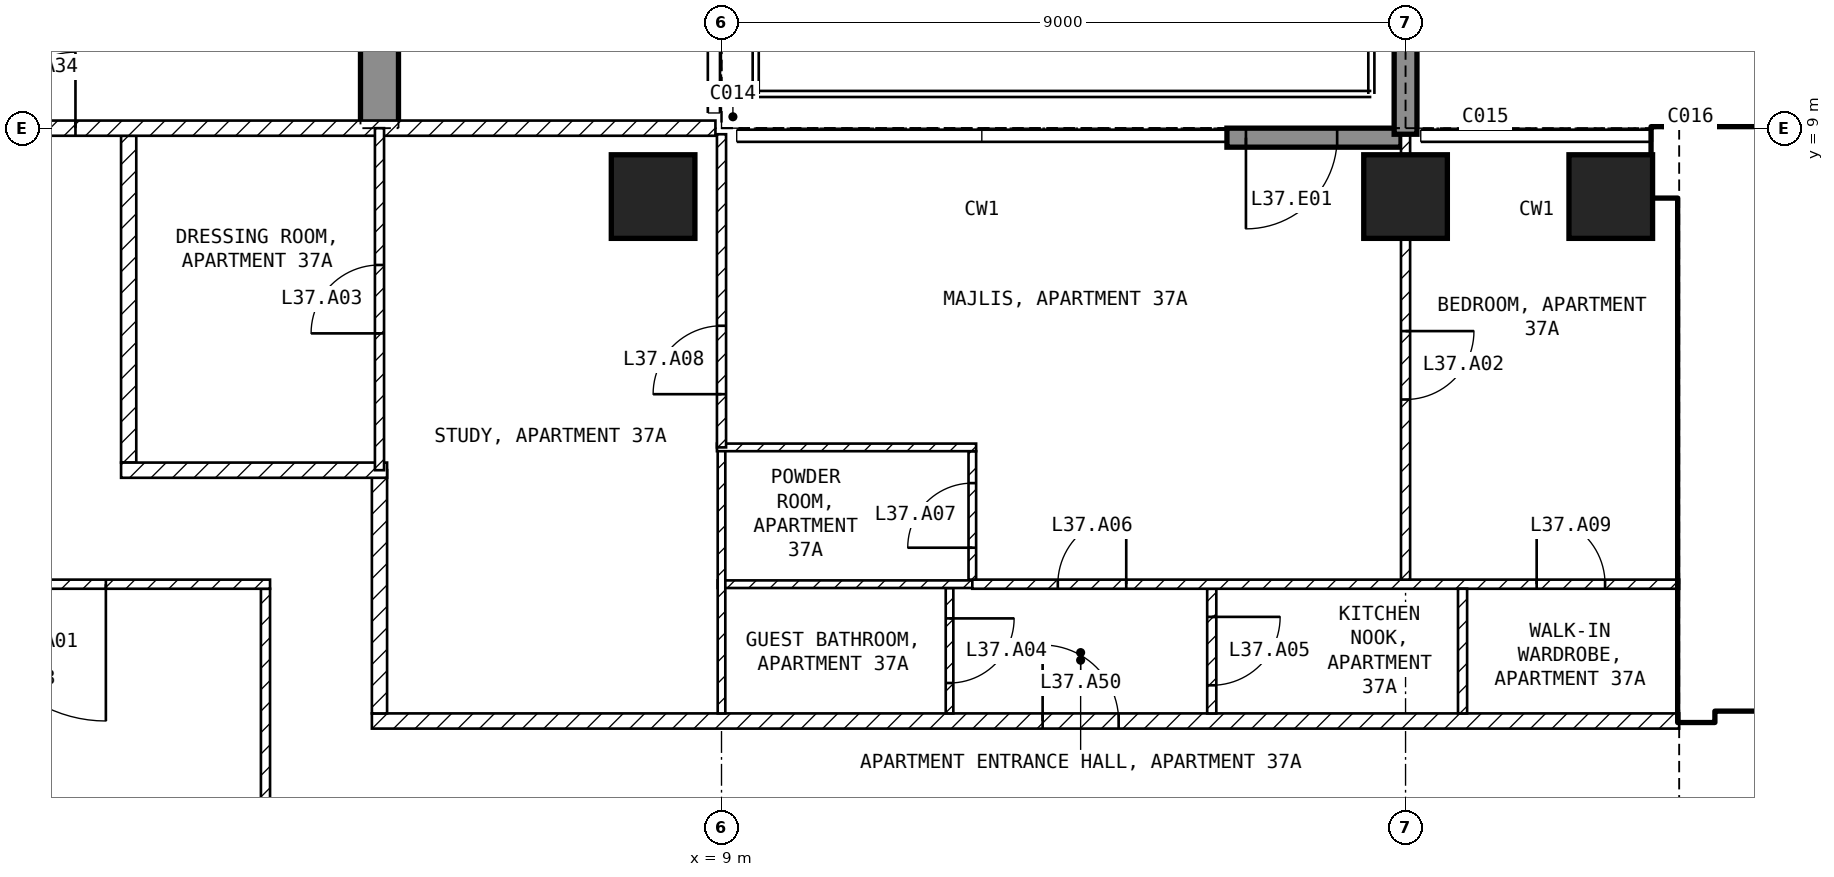
"""IFC4 building model, lengths in metres.
Left out: names, types, materials, properties, quantities, classifications, styles, units other than length and angle.
Written with IfcOpenShell. Run it as: python <this file> out.ifc"""

import sys

from ifc_helpers import new_model, si_unit, direction, frame, frame_2d, origin, origin_2d, place, context, subcontext, project, spatial, polyline, rectangle, outline, extrude, element, fill, save


model = new_model("IFC4")
c1 = context("Model", 3, precision=1e-05, world=origin(), true_north=direction((0.0, 1.0)))
c2 = subcontext(c1, "Body", "Model", "MODEL_VIEW")
j1 = project(units=[si_unit("LENGTHUNIT", "METRE"), si_unit("PLANEANGLEUNIT", "RADIAN")], contexts=[c1])
p1 = place(None, origin())
s1 = spatial("IfcSite", under=j1, at=p1, CompositionType="ELEMENT")
p2 = place(p1, origin())
s2 = spatial("IfcBuilding", under=s1, at=p2, CompositionType="ELEMENT")
p3 = place(p2, frame((0.0, 0.0, 151.4)))
s3 = spatial("IfcBuildingStorey", under=s2, at=p3, CompositionType="ELEMENT", Elevation=151.4)
for number, where, z_axis, x_axis in (
    (1, (8.1, 8.1, -0.25), (0.0, 0.0, 1.0), (1.0, 0.0, 0.0)),
    (2, (18.0, 8.1, -0.25), (0.0, 0.0, 1.0), (1.0, 0.0, 0.0)),
    (3, (20.7, 8.1, -0.25), (0.0, 0.0, 1.0), (1.0, 0.0, 0.0)),
):
    element("IfcColumn", number, at=place(p3, frame(where, z_axis=z_axis, x_axis=x_axis)), inside=s3, PredefinedType="COLUMN", context=c2, shape_type="SweptSolid", body=[
        extrude(rectangle(XDim=1.1, YDim=1.1, at=origin_2d()), origin(), (0.0, 0.0, 1.0), 3.45),
    ])
p4 = place(p3, frame((4.25, 9.0, -0.25), z_axis=(1.0, 0.0, 0.0), x_axis=(0.0, 1.0, 0.0)))
e4 = element("IfcWall", 4, at=p4, inside=s3, PredefinedType="SHEAR", context=c2, shape_type="SweptSolid", body=[
    extrude(outline(polyline([(0.0, 0.0), (2.1, 0.0), (2.1, 2.65), (4.5, 2.65), (4.5, 0.0), (9.9, 0.0), (9.9, 2.65), (12.3, 2.65), (12.3, 0.0), (16.55, 0.0), (16.55, 3.45), (0.0, 3.45), (0.0, 0.0)])), origin(), (0.0, 0.0, 1.0), 0.5),
])
p5 = place(p3, frame((17.94, 8.875, 0.0), z_axis=(0.0, 0.0, 1.0), x_axis=(-1.0, 0.0, 0.0)))
e5 = element("IfcWall", 5, at=p5, inside=s3, PredefinedType="SOLIDWALL", context=c2, shape_type="SweptSolid", body=[
    extrude(rectangle(XDim=2.29, YDim=0.25, at=frame_2d((1.145, 0.0))), origin(), (0.0, 0.0, 1.0), 3.2),
])
p6 = place(p5, frame((0.84, 0.0, 0.0)))
e6 = element("IfcOpeningElement", 6, at=p6, cuts=e5, PredefinedType="OPENING", context=c2, shape_type="SweptSolid", body=[
    extrude(rectangle(XDim=1.2, YDim=2.4, at=frame_2d((0.6, 1.2))), frame((0.0, 0.135, 0.0), z_axis=(0.0, -1.0, 0.0), x_axis=(1.0, 0.0, 0.0)), (0.0, 0.0, 1.0), 0.27),
])
p7 = place(p3, frame((18.0, 8.92, 0.0), z_axis=(0.0, 0.0, 1.0), x_axis=(0.0, 1.0, 0.0)))
e7 = element("IfcWall", 7, at=p7, inside=s3, PredefinedType="SOLIDWALL", context=c2, shape_type="SweptSolid", body=[
    extrude(rectangle(XDim=2.82, YDim=0.3, at=frame_2d((1.41, 0.0))), origin(), (0.0, 0.0, 1.0), 3.2),
])
p8 = place(p3, frame((21.25, 8.55, 0.0), z_axis=(0.0, 0.0, 1.0), x_axis=(1.0, 0.0, 0.0)))
e8 = element("IfcWall", 8, at=p8, inside=s3, PredefinedType="SHEAR", context=c2, shape_type="SweptSolid", body=[
    extrude(rectangle(XDim=8.2, YDim=0.9, at=frame_2d((4.1, 0.0))), origin(), (0.0, 0.0, 1.0), 3.2),
])
p9 = place(p3, frame((21.825, 1.2, 0.0), z_axis=(0.0, 0.0, 1.0), x_axis=(0.0, 1.0, 0.0)))
e9 = element("IfcWall", 9, at=p9, inside=s3, PredefinedType="SHEAR", context=c2, shape_type="SweptSolid", body=[
    extrude(rectangle(XDim=6.9, YDim=0.45, at=frame_2d((3.45, 0.0))), origin(), (0.0, 0.0, 1.0), 3.2),
])
p10 = place(p3, frame((22.05, 1.45, 0.0), z_axis=(0.0, 0.0, 1.0), x_axis=(1.0, 0.0, 0.0)))
e10 = element("IfcWall", 10, at=p10, inside=s3, PredefinedType="SOLIDWALL", context=c2, shape_type="SweptSolid", body=[
    extrude(rectangle(XDim=11.0, YDim=0.2, at=frame_2d((5.5, 0.0))), origin(), (0.0, 0.0, 1.0), 3.2),
])
p11 = place(p10, frame((0.75, 0.0, 0.0)))
e11 = element("IfcOpeningElement", 11, at=p11, cuts=e10, PredefinedType="OPENING", context=c2, shape_type="SweptSolid", body=[
    extrude(rectangle(XDim=1.0, YDim=2.1, at=frame_2d((0.5, 1.05))), frame((0.0, 0.11, 0.0), z_axis=(0.0, -1.0, 0.0), x_axis=(1.0, 0.0, 0.0)), (0.0, 0.0, 1.0), 0.22),
])
p12 = place(p10, frame((3.25, 0.0, 0.0)))
e12 = element("IfcOpeningElement", 12, at=p12, cuts=e10, PredefinedType="OPENING", context=c2, shape_type="SweptSolid", body=[
    extrude(rectangle(XDim=1.0, YDim=2.1, at=frame_2d((0.5, 1.05))), frame((0.0, 0.11, 0.0), z_axis=(0.0, -1.0, 0.0), x_axis=(1.0, 0.0, 0.0)), (0.0, 0.0, 1.0), 0.22),
])
p13 = place(p10, frame((9.075, 0.0, 0.0)))
e13 = element("IfcOpeningElement", 13, at=p13, cuts=e10, PredefinedType="OPENING", context=c2, shape_type="SweptSolid", body=[
    extrude(rectangle(XDim=0.9, YDim=2.1, at=frame_2d((0.45, 1.05))), frame((0.0, 0.11, 0.0), z_axis=(0.0, -1.0, 0.0), x_axis=(1.0, 0.0, 0.0)), (0.0, 0.0, 1.0), 0.22),
])
p14 = place(p3, frame((22.05, 5.15, 0.0), z_axis=(0.0, 0.0, 1.0), x_axis=(1.0, 0.0, 0.0)))
e14 = element("IfcWall", 14, at=p14, inside=s3, PredefinedType="SOLIDWALL", context=c2, shape_type="SweptSolid", body=[
    extrude(rectangle(XDim=6.3, YDim=0.2, at=frame_2d((3.15, 0.0))), origin(), (0.0, 0.0, 1.0), 3.2),
])
p15 = place(p14, frame((0.2, 0.0, 0.0)))
e15 = element("IfcOpeningElement", 15, at=p15, cuts=e14, PredefinedType="OPENING", context=c2, shape_type="SweptSolid", body=[
    extrude(rectangle(XDim=1.0, YDim=2.1, at=frame_2d((0.5, 1.05))), frame((0.0, 0.11, 0.0), z_axis=(0.0, -1.0, 0.0), x_axis=(1.0, 0.0, 0.0)), (0.0, 0.0, 1.0), 0.22),
])
p16 = place(p3, frame((3.0, -2.94, 0.0), z_axis=(0.0, 0.0, 1.0), x_axis=(0.0, 1.0, 0.0)))
e16 = element("IfcWall", 16, at=p16, inside=s3, PredefinedType="PARTITIONING", context=c2, shape_type="SweptSolid", body=[
    extrude(rectangle(XDim=5.88, YDim=0.12, at=frame_2d((2.94, 0.0))), origin(), (0.0, 0.0, 1.0), 3.2),
])
p17 = place(p3, frame((3.06, 3.0, 0.0), z_axis=(0.0, 0.0, 1.0), x_axis=(-1.0, 0.0, 0.0)))
e17 = element("IfcWall", 17, at=p17, inside=s3, PredefinedType="PARTITIONING", context=c2, shape_type="SweptSolid", body=[
    extrude(rectangle(XDim=6.12, YDim=0.12, at=frame_2d((3.06, 0.0))), origin(), (0.0, 0.0, 1.0), 3.2),
])
p18 = place(p17, frame((2.16, 0.0, 0.0)))
e18 = element("IfcOpeningElement", 18, at=p18, cuts=e17, PredefinedType="OPENING", context=c2, shape_type="SweptSolid", body=[
    extrude(rectangle(XDim=1.8, YDim=2.1, at=frame_2d((0.9, 1.05))), frame((0.0, 0.07, 0.0), z_axis=(0.0, -1.0, 0.0), x_axis=(1.0, 0.0, 0.0)), (0.0, 0.0, 1.0), 0.14),
])
p19 = place(p3, frame((4.4, 1.2, 0.0), z_axis=(0.0, 0.0, 1.0), x_axis=(1.0, 0.0, 0.0)))
e19 = element("IfcWall", 19, at=p19, inside=s3, PredefinedType="PARTITIONING", context=c2, shape_type="SweptSolid", body=[
    extrude(rectangle(XDim=17.2, YDim=0.2, at=frame_2d((8.6, 0.0))), origin(), (0.0, 0.0, 1.0), 3.2),
])
p20 = place(p19, frame((8.825, 0.0, 0.0)))
e20 = element("IfcOpeningElement", 20, at=p20, cuts=e19, PredefinedType="OPENING", context=c2, shape_type="SweptSolid", body=[
    extrude(rectangle(XDim=1.0, YDim=2.1, at=frame_2d((0.5, 1.05))), frame((0.0, 0.11, 0.0), z_axis=(0.0, -1.0, 0.0), x_axis=(1.0, 0.0, 0.0)), (0.0, 0.0, 1.0), 0.22),
])
p21 = place(p3, frame((4.5, 4.5, 0.0), z_axis=(0.0, 0.0, 1.0), x_axis=(0.0, -1.0, 0.0)))
e21 = element("IfcWall", 21, at=p21, inside=s3, PredefinedType="PARTITIONING", context=c2, shape_type="SweptSolid", body=[
    extrude(rectangle(XDim=3.2, YDim=0.2, at=frame_2d((1.6, 0.0))), origin(), (0.0, 0.0, 1.0), 3.2),
])
p22 = place(p3, frame((1.2, 8.9, 0.0), z_axis=(0.0, 0.0, 1.0), x_axis=(0.0, -1.0, 0.0)))
e22 = element("IfcWall", 22, at=p22, inside=s3, PredefinedType="PARTITIONING", context=c2, shape_type="SweptSolid", body=[
    extrude(rectangle(XDim=4.3, YDim=0.2, at=frame_2d((2.15, 0.0))), origin(), (0.0, 0.0, 1.0), 3.2),
])
p23 = place(p3, frame((1.1, 4.5, 0.0), z_axis=(0.0, 0.0, 1.0), x_axis=(1.0, 0.0, 0.0)))
e23 = element("IfcWall", 23, at=p23, inside=s3, PredefinedType="PARTITIONING", context=c2, shape_type="SweptSolid", body=[
    extrude(rectangle(XDim=3.5, YDim=0.2, at=frame_2d((1.75, 0.0))), origin(), (0.0, 0.0, 1.0), 3.2),
])
p24 = place(p3, frame((-8.92, 9.0, 0.0), z_axis=(0.0, 0.0, 1.0), x_axis=(1.0, 0.0, 0.0)))
e24 = element("IfcWall", 24, at=p24, inside=s3, PredefinedType="PARTITIONING", context=c2, shape_type="SweptSolid", body=[
    extrude(rectangle(XDim=17.84, YDim=0.2, at=frame_2d((8.92, 0.0))), origin(), (0.0, 0.0, 1.0), 3.2),
])
p25 = place(p24, frame((8.42, 0.0, 0.0)))
e25 = element("IfcOpeningElement", 25, at=p25, cuts=e24, PredefinedType="OPENING", context=c2, shape_type="SweptSolid", body=[
    extrude(rectangle(XDim=1.0, YDim=2.1, at=frame_2d((0.5, 1.05))), frame((0.0, 0.11, 0.0), z_axis=(0.0, -1.0, 0.0), x_axis=(1.0, 0.0, 0.0)), (0.0, 0.0, 1.0), 0.22),
])
p26 = place(p3, frame((12.0, 2.95, 0.0), z_axis=(0.0, 0.0, 1.0), x_axis=(0.0, -1.0, 0.0)))
e26 = element("IfcWall", 26, at=p26, inside=s3, PredefinedType="PARTITIONING", context=c2, shape_type="SweptSolid", body=[
    extrude(rectangle(XDim=1.65, YDim=0.1, at=frame_2d((0.825, 0.0))), origin(), (0.0, 0.0, 1.0), 3.2),
])
p27 = place(p26, frame((0.4, 0.0, 0.0)))
e27 = element("IfcOpeningElement", 27, at=p27, cuts=e26, PredefinedType="OPENING", context=c2, shape_type="SweptSolid", body=[
    extrude(rectangle(XDim=0.85, YDim=2.1, at=frame_2d((0.425, 1.05))), frame((0.0, 0.06, 0.0), z_axis=(0.0, -1.0, 0.0), x_axis=(1.0, 0.0, 0.0)), (0.0, 0.0, 1.0), 0.12),
])
p28 = place(p3, frame((8.95, 3.0, 0.0), z_axis=(0.0, 0.0, 1.0), x_axis=(1.0, 0.0, 0.0)))
e28 = element("IfcWall", 28, at=p28, inside=s3, PredefinedType="PARTITIONING", context=c2, shape_type="SweptSolid", body=[
    extrude(rectangle(XDim=3.35, YDim=0.1, at=frame_2d((1.675, 0.0))), origin(), (0.0, 0.0, 1.0), 3.2),
])
p29 = place(p3, frame((9.0, 1.3, 0.0), z_axis=(0.0, 0.0, 1.0), x_axis=(0.0, 1.0, 0.0)))
e29 = element("IfcWall", 29, at=p29, inside=s3, PredefinedType="PARTITIONING", context=c2, shape_type="SweptSolid", body=[
    extrude(rectangle(XDim=3.5, YDim=0.1, at=frame_2d((1.75, 0.0))), origin(), (0.0, 0.0, 1.0), 3.2),
])
p30 = place(p3, frame((15.45, 2.94, 0.0), z_axis=(0.0, 0.0, 1.0), x_axis=(0.0, -1.0, 0.0)))
e30 = element("IfcWall", 30, at=p30, inside=s3, PredefinedType="PARTITIONING", context=c2, shape_type="SweptSolid", body=[
    extrude(rectangle(XDim=1.64, YDim=0.12, at=frame_2d((0.82, 0.0))), origin(), (0.0, 0.0, 1.0), 3.2),
])
p31 = place(p30, frame((0.37, 0.0, 0.0)))
e31 = element("IfcOpeningElement", 31, at=p31, cuts=e30, PredefinedType="OPENING", context=c2, shape_type="SweptSolid", body=[
    extrude(rectangle(XDim=0.9, YDim=2.1, at=frame_2d((0.45, 1.05))), frame((0.0, 0.07, 0.0), z_axis=(0.0, -1.0, 0.0), x_axis=(1.0, 0.0, 0.0)), (0.0, 0.0, 1.0), 0.14),
])
p32 = place(p3, frame((12.3, 3.0, 0.0), z_axis=(0.0, 0.0, 1.0), x_axis=(1.0, 0.0, 0.0)))
e32 = element("IfcWall", 32, at=p32, inside=s3, PredefinedType="PARTITIONING", context=c2, shape_type="SweptSolid", body=[
    extrude(rectangle(XDim=9.3, YDim=0.12, at=frame_2d((4.65, 0.0))), origin(), (0.0, 0.0, 1.0), 3.2),
])
p33 = place(p32, frame((1.125, 0.0, 0.0)))
e33 = element("IfcOpeningElement", 33, at=p33, cuts=e32, PredefinedType="OPENING", context=c2, shape_type="SweptSolid", body=[
    extrude(rectangle(XDim=0.9, YDim=2.1, at=frame_2d((0.45, 1.05))), frame((0.0, 0.07, 0.0), z_axis=(0.0, -1.0, 0.0), x_axis=(1.0, 0.0, 0.0)), (0.0, 0.0, 1.0), 0.14),
])
p34 = place(p32, frame((7.425, 0.0, 0.0)))
e34 = element("IfcOpeningElement", 34, at=p34, cuts=e32, PredefinedType="OPENING", context=c2, shape_type="SweptSolid", body=[
    extrude(rectangle(XDim=0.9, YDim=2.1, at=frame_2d((0.45, 1.05))), frame((0.0, 0.07, 0.0), z_axis=(0.0, -1.0, 0.0), x_axis=(1.0, 0.0, 0.0)), (0.0, 0.0, 1.0), 0.14),
])
p35 = place(p3, frame((18.75, 2.94, 0.0), z_axis=(0.0, 0.0, 1.0), x_axis=(0.0, -1.0, 0.0)))
e35 = element("IfcWall", 35, at=p35, inside=s3, PredefinedType="PARTITIONING", context=c2, shape_type="SweptSolid", body=[
    extrude(rectangle(XDim=1.64, YDim=0.12, at=frame_2d((0.82, 0.0))), origin(), (0.0, 0.0, 1.0), 3.2),
])
p36 = place(p3, frame((12.3, 3.06, 0.0), z_axis=(0.0, 0.0, 1.0), x_axis=(0.0, 1.0, 0.0)))
e36 = element("IfcWall", 36, at=p36, inside=s3, PredefinedType="PARTITIONING", context=c2, shape_type="SweptSolid", body=[
    extrude(rectangle(XDim=1.69, YDim=0.1, at=frame_2d((0.845, 0.0))), origin(), (0.0, 0.0, 1.0), 3.2),
])
p37 = place(p36, frame((0.42, 0.0, 0.0)))
e37 = element("IfcOpeningElement", 37, at=p37, cuts=e36, PredefinedType="OPENING", context=c2, shape_type="SweptSolid", body=[
    extrude(rectangle(XDim=0.85, YDim=2.1, at=frame_2d((0.425, 1.05))), frame((0.0, 0.06, 0.0), z_axis=(0.0, -1.0, 0.0), x_axis=(1.0, 0.0, 0.0)), (0.0, 0.0, 1.0), 0.12),
])
p38 = place(p3, frame((12.35, 4.8, 0.0), z_axis=(0.0, 0.0, 1.0), x_axis=(-1.0, 0.0, 0.0)))
e38 = element("IfcWall", 38, at=p38, inside=s3, PredefinedType="PARTITIONING", context=c2, shape_type="SweptSolid", body=[
    extrude(rectangle(XDim=3.41, YDim=0.1, at=frame_2d((1.705, 0.0))), origin(), (0.0, 0.0, 1.0), 3.2),
])
p39 = place(p3, frame((18.0, 8.92, 0.0), z_axis=(0.0, 0.0, 1.0), x_axis=(0.0, -1.0, 0.0)))
e39 = element("IfcWall", 39, at=p39, inside=s3, PredefinedType="PARTITIONING", context=c2, shape_type="SweptSolid", body=[
    extrude(rectangle(XDim=5.86, YDim=0.12, at=frame_2d((2.93, 0.0))), origin(), (0.0, 0.0, 1.0), 2.364),
])
p40 = place(p39, frame((2.59, 0.0, 0.0)))
e40 = element("IfcOpeningElement", 40, at=p40, cuts=e39, PredefinedType="OPENING", context=c2, shape_type="SweptSolid", body=[
    extrude(rectangle(XDim=0.9, YDim=2.1, at=frame_2d((0.45, 1.05))), frame((0.0, 0.07, 0.0), z_axis=(0.0, -1.0, 0.0), x_axis=(1.0, 0.0, 0.0)), (0.0, 0.0, 1.0), 0.14),
])
p41 = place(p3, frame((9.0, 4.8, 0.0), z_axis=(0.0, 0.0, 1.0), x_axis=(0.0, 1.0, 0.0)))
e41 = element("IfcWall", 41, at=p41, inside=s3, PredefinedType="PARTITIONING", context=c2, shape_type="SweptSolid", body=[
    extrude(rectangle(XDim=4.12, YDim=0.12, at=frame_2d((2.06, 0.0))), origin(), (0.0, 0.0, 1.0), 3.2),
])
p42 = place(p41, frame((0.7, 0.0, 0.0)))
e42 = element("IfcOpeningElement", 42, at=p42, cuts=e41, PredefinedType="OPENING", context=c2, shape_type="SweptSolid", body=[
    extrude(rectangle(XDim=0.9, YDim=2.1, at=frame_2d((0.45, 1.05))), frame((0.0, 0.07, 0.0), z_axis=(0.0, -1.0, 0.0), x_axis=(1.0, 0.0, 0.0)), (0.0, 0.0, 1.0), 0.14),
])
p43 = place(p3, frame((4.5, 4.5, 0.0), z_axis=(0.0, 0.0, 1.0), x_axis=(0.0, 1.0, 0.0)))
e43 = element("IfcWall", 43, at=p43, inside=s3, PredefinedType="PARTITIONING", context=c2, shape_type="SweptSolid", body=[
    extrude(rectangle(XDim=4.5, YDim=0.12, at=frame_2d((2.25, 0.0))), origin(), (0.0, 0.0, 1.0), 3.2),
])
p44 = place(p43, frame((1.8, 0.0, 0.0)))
e44 = element("IfcOpeningElement", 44, at=p44, cuts=e43, PredefinedType="OPENING", context=c2, shape_type="SweptSolid", body=[
    extrude(rectangle(XDim=0.9, YDim=2.1, at=frame_2d((0.45, 1.05))), frame((0.0, 0.07, 0.0), z_axis=(0.0, -1.0, 0.0), x_axis=(1.0, 0.0, 0.0)), (0.0, 0.0, 1.0), 0.14),
])
p45 = place(p6, origin())
e45 = element("IfcDoor", 45, at=p45, inside=s3, OperationType="SINGLE_SWING_RIGHT", PredefinedType="DOOR", context=c2, shape_type="SweptSolid", body=[
    extrude(rectangle(XDim=1.2, YDim=2.4, at=frame_2d((0.6, 1.2))), frame((0.0, 0.025, 0.0), z_axis=(0.0, -1.0, 0.0), x_axis=(1.0, 0.0, 0.0)), (0.0, 0.0, 1.0), 0.05),
])
fill(e6, e45)
p46 = place(p15, origin())
e46 = element("IfcDoor", 46, at=p46, inside=s3, OperationType="SINGLE_SWING_LEFT", PredefinedType="DOOR", context=c2, shape_type="SweptSolid", body=[
    extrude(rectangle(XDim=1.0, YDim=2.1, at=frame_2d((0.5, 1.05))), frame((0.0, 0.025, 0.0), z_axis=(0.0, -1.0, 0.0), x_axis=(1.0, 0.0, 0.0)), (0.0, 0.0, 1.0), 0.05),
])
fill(e15, e46)
p47 = place(p18, origin())
e47 = element("IfcDoor", 47, at=p47, inside=s3, OperationType="SINGLE_SWING_LEFT", PredefinedType="DOOR", context=c2, shape_type="SweptSolid", body=[
    extrude(rectangle(XDim=1.8, YDim=2.1, at=frame_2d((0.9, 1.05))), frame((0.0, 0.025, 0.0), z_axis=(0.0, -1.0, 0.0), x_axis=(1.0, 0.0, 0.0)), (0.0, 0.0, 1.0), 0.05),
])
fill(e18, e47)
p48 = place(p40, origin())
e48 = element("IfcDoor", 48, at=p48, inside=s3, OperationType="SINGLE_SWING_LEFT", PredefinedType="DOOR", context=c2, shape_type="SweptSolid", body=[
    extrude(rectangle(XDim=0.9, YDim=2.1, at=frame_2d((0.45, 1.05))), frame((0.0, 0.025, 0.0), z_axis=(0.0, -1.0, 0.0), x_axis=(1.0, 0.0, 0.0)), (0.0, 0.0, 1.0), 0.05),
])
fill(e40, e48)
p49 = place(p44, origin())
e49 = element("IfcDoor", 49, at=p49, inside=s3, OperationType="SINGLE_SWING_LEFT", PredefinedType="DOOR", context=c2, shape_type="SweptSolid", body=[
    extrude(rectangle(XDim=0.9, YDim=2.1, at=frame_2d((0.45, 1.05))), frame((0.0, 0.025, 0.0), z_axis=(0.0, -1.0, 0.0), x_axis=(1.0, 0.0, 0.0)), (0.0, 0.0, 1.0), 0.05),
])
fill(e44, e49)
p50 = place(p27, origin())
e50 = element("IfcDoor", 50, at=p50, inside=s3, OperationType="SINGLE_SWING_LEFT", PredefinedType="DOOR", context=c2, shape_type="SweptSolid", body=[
    extrude(rectangle(XDim=0.85, YDim=2.1, at=frame_2d((0.425, 1.05))), frame((0.0, 0.025, 0.0), z_axis=(0.0, -1.0, 0.0), x_axis=(1.0, 0.0, 0.0)), (0.0, 0.0, 1.0), 0.05),
])
fill(e27, e50)
p51 = place(p31, origin())
e51 = element("IfcDoor", 51, at=p51, inside=s3, OperationType="SINGLE_SWING_LEFT", PredefinedType="DOOR", context=c2, shape_type="SweptSolid", body=[
    extrude(rectangle(XDim=0.9, YDim=2.1, at=frame_2d((0.45, 1.05))), frame((0.0, 0.025, 0.0), z_axis=(0.0, -1.0, 0.0), x_axis=(1.0, 0.0, 0.0)), (0.0, 0.0, 1.0), 0.05),
])
fill(e31, e51)
p52 = place(p33, origin())
e52 = element("IfcDoor", 52, at=p52, inside=s3, OperationType="SINGLE_SWING_RIGHT", PredefinedType="DOOR", context=c2, shape_type="SweptSolid", body=[
    extrude(rectangle(XDim=0.9, YDim=2.1, at=frame_2d((0.45, 1.05))), frame((0.0, 0.025, 0.0), z_axis=(0.0, -1.0, 0.0), x_axis=(1.0, 0.0, 0.0)), (0.0, 0.0, 1.0), 0.05),
])
fill(e33, e52)
p53 = place(p37, origin())
e53 = element("IfcDoor", 53, at=p53, inside=s3, OperationType="SINGLE_SWING_LEFT", PredefinedType="DOOR", context=c2, shape_type="SweptSolid", body=[
    extrude(rectangle(XDim=0.85, YDim=2.1, at=frame_2d((0.425, 1.05))), frame((0.0, 0.025, 0.0), z_axis=(0.0, -1.0, 0.0), x_axis=(1.0, 0.0, 0.0)), (0.0, 0.0, 1.0), 0.05),
])
fill(e37, e53)
p54 = place(p42, origin())
e54 = element("IfcDoor", 54, at=p54, inside=s3, OperationType="SINGLE_SWING_LEFT", PredefinedType="DOOR", context=c2, shape_type="SweptSolid", body=[
    extrude(rectangle(XDim=0.9, YDim=2.1, at=frame_2d((0.45, 1.05))), frame((0.0, 0.025, 0.0), z_axis=(0.0, -1.0, 0.0), x_axis=(1.0, 0.0, 0.0)), (0.0, 0.0, 1.0), 0.05),
])
fill(e42, e54)
p55 = place(p34, origin())
e55 = element("IfcDoor", 55, at=p55, inside=s3, OperationType="SINGLE_SWING_LEFT", PredefinedType="DOOR", context=c2, shape_type="SweptSolid", body=[
    extrude(rectangle(XDim=0.9, YDim=2.1, at=frame_2d((0.45, 1.05))), frame((0.0, 0.025, 0.0), z_axis=(0.0, -1.0, 0.0), x_axis=(1.0, 0.0, 0.0)), (0.0, 0.0, 1.0), 0.05),
])
fill(e34, e55)
p56 = place(p25, origin())
e56 = element("IfcDoor", 56, at=p56, inside=s3, OperationType="SINGLE_SWING_RIGHT", PredefinedType="DOOR", context=c2, shape_type="SweptSolid", body=[
    extrude(rectangle(XDim=1.0, YDim=2.1, at=frame_2d((0.5, 1.05))), frame((0.0, 0.025, 0.0), z_axis=(0.0, -1.0, 0.0), x_axis=(1.0, 0.0, 0.0)), (0.0, 0.0, 1.0), 0.05),
])
fill(e25, e56)
p57 = place(p20, origin())
e57 = element("IfcDoor", 57, at=p57, inside=s3, OperationType="SINGLE_SWING_LEFT", PredefinedType="DOOR", context=c2, shape_type="SweptSolid", body=[
    extrude(rectangle(XDim=1.0, YDim=2.1, at=frame_2d((0.5, 1.05))), frame((0.0, 0.025, 0.0), z_axis=(0.0, -1.0, 0.0), x_axis=(1.0, 0.0, 0.0)), (0.0, 0.0, 1.0), 0.05),
])
fill(e20, e57)
save(model, sys.argv[1])
